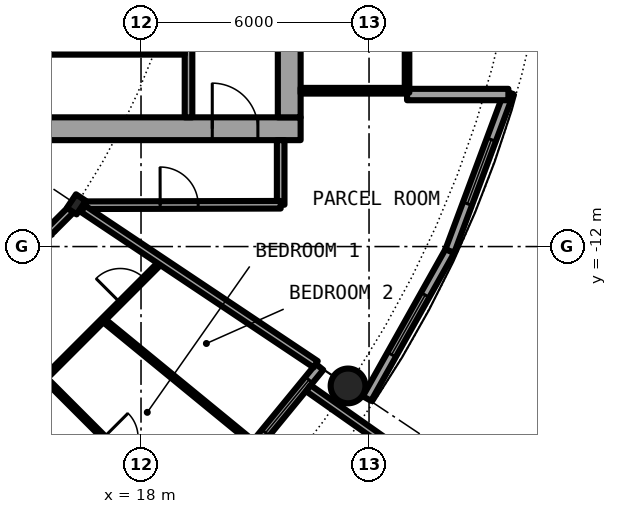
"""IFC4 building model, lengths in metres.
Left out: names, types, materials, properties, quantities, classifications, styles, units other than length and angle.
Written with IfcOpenShell. Run it as: python <this file> out.ifc"""

import sys

from ifc_helpers import new_model, si_unit, direction, frame, frame_2d, origin, origin_2d, place, context, subcontext, project, spatial, rectangle, hollow_circle, i_section, extrude, element, fill, save


model = new_model("IFC4")
c1 = context("Model", 3, precision=1e-05, world=origin(), true_north=direction((0.0, 1.0)))
c2 = subcontext(c1, "Body", "Model", "MODEL_VIEW")
j1 = project(units=[si_unit("LENGTHUNIT", "METRE"), si_unit("PLANEANGLEUNIT", "RADIAN")], contexts=[c1])
p1 = place(None, origin())
s1 = spatial("IfcSite", under=j1, at=p1, CompositionType="ELEMENT")
p2 = place(p1, origin())
s2 = spatial("IfcBuilding", under=s1, at=p2, CompositionType="ELEMENT")
p3 = place(p2, frame((0.0, 0.0, 120.8)))
s3 = spatial("IfcBuildingStorey", under=s2, at=p3, CompositionType="ELEMENT", Elevation=120.8)
p4 = place(p3, frame((23.448, -15.667, 0.0), z_axis=(0.0, 0.0, 1.0), x_axis=(1.0, 0.0, 0.0)))
e1 = element("IfcColumn", 1, at=p4, inside=s3, PredefinedType="COLUMN", context=c2, shape_type="SweptSolid", body=[
    extrude(hollow_circle(Radius=0.457, WallThickness=0.04, at=origin_2d()), origin(), (0.0, 0.0, 1.0), 3.05),
])
p5 = place(p3, frame((16.297, -10.889, 0.0), z_axis=(0.0, 0.0, 1.0), x_axis=(0.831469612303, -0.55557023302, 0.0)))
e2 = element("IfcColumn", 2, at=p5, inside=s3, PredefinedType="COLUMN", context=c2, shape_type="SweptSolid", body=[
    extrude(i_section(OverallWidth=0.307, OverallDepth=0.432, WebThickness=0.021, FlangeThickness=0.04, FilletRadius=0.027, at=origin_2d()), origin(), (0.0, 0.0, 1.0), 3.05),
])
p6 = place(p3, frame((19.304, -19.304, 0.0), z_axis=(0.0, 0.0, 1.0), x_axis=(0.634382322723, 0.773019449054, 0.0)))
e3 = element("IfcWall", 3, at=p6, inside=s3, PredefinedType="SOLIDWALL", context=c2, shape_type="SweptSolid", body=[
    extrude(rectangle(XDim=5.352, YDim=0.25, at=frame_2d((2.676, 0.0))), origin(), (0.0, 0.0, 1.0), 2.7),
])
p7 = place(p6, frame((0.841, 0.0, 0.0)))
e4 = element("IfcOpeningElement", 4, at=p7, cuts=e3, PredefinedType="OPENING", context=c2, shape_type="SweptSolid", body=[
    extrude(rectangle(XDim=1.0, YDim=2.2, at=frame_2d((0.5, 1.1))), frame((0.0, 0.135, 0.0), z_axis=(0.0, -1.0, 0.0), x_axis=(1.0, 0.0, 0.0)), (0.0, 0.0, 1.0), 0.27),
])
p8 = place(p6, frame((3.111, 0.0, 0.3)))
e5 = element("IfcOpeningElement", 5, at=p8, cuts=e3, PredefinedType="OPENING", context=c2, shape_type="SweptSolid", body=[
    extrude(rectangle(XDim=1.8, YDim=2.1, at=frame_2d((0.9, 1.05))), frame((0.0, 0.135, 0.0), z_axis=(0.0, -1.0, 0.0), x_axis=(1.0, 0.0, 0.0)), (0.0, 0.0, 1.0), 0.27),
])
p9 = place(p3, frame((22.402, -15.726, -0.03), z_axis=(0.0, 0.0, 1.0), x_axis=(0.818275399393, -0.574826383135, 0.0)))
e6 = element("IfcWall", 6, at=p9, inside=s3, PredefinedType="SOLIDWALL", context=c2, shape_type="SweptSolid", body=[
    extrude(rectangle(XDim=2.929, YDim=0.2, at=frame_2d((1.465, 0.0))), origin(), (0.0, 0.0, 1.0), 2.73),
])
p10 = place(p3, frame((23.946, -16.0, 0.0), z_axis=(0.0, 0.0, 1.0), x_axis=(0.489696356642, 0.871893042919, 0.0)))
e7 = element("IfcWall", 7, at=p10, inside=s3, PredefinedType="SOLIDWALL", context=c2, shape_type="SweptSolid", body=[
    extrude(rectangle(XDim=4.454, YDim=0.25, at=frame_2d((2.227, 0.0))), origin(), (0.0, 0.0, 1.0), 2.7),
])
p11 = place(p10, frame((1.327, 0.0, 0.3)))
e8 = element("IfcOpeningElement", 8, at=p11, cuts=e7, PredefinedType="OPENING", context=c2, shape_type="SweptSolid", body=[
    extrude(rectangle(XDim=1.8, YDim=2.1, at=frame_2d((0.9, 1.05))), frame((0.0, 0.135, 0.0), z_axis=(0.0, -1.0, 0.0), x_axis=(1.0, 0.0, 0.0)), (0.0, 0.0, 1.0), 0.27),
])
p12 = place(p3, frame((26.127, -12.117, 0.0), z_axis=(0.0, 0.0, 1.0), x_axis=(0.349247811493, 0.937030397675, 0.0)))
e9 = element("IfcWall", 9, at=p12, inside=s3, PredefinedType="SOLIDWALL", context=c2, shape_type="SweptSolid", body=[
    extrude(rectangle(XDim=4.452, YDim=0.25, at=frame_2d((2.226, 0.0))), origin(), (0.0, 0.0, 1.0), 2.7),
])
p13 = place(p12, frame((1.327, 0.0, 0.3)))
e10 = element("IfcOpeningElement", 10, at=p13, cuts=e9, PredefinedType="OPENING", context=c2, shape_type="SweptSolid", body=[
    extrude(rectangle(XDim=1.8, YDim=2.1, at=frame_2d((0.9, 1.05))), frame((0.0, 0.135, 0.0), z_axis=(0.0, -1.0, 0.0), x_axis=(1.0, 0.0, 0.0)), (0.0, 0.0, 1.0), 0.27),
])
p14 = place(p3, frame((25.0, -8.0, 0.0), z_axis=(0.0, 0.0, 1.0), x_axis=(1.0, 0.0, 0.0)))
e11 = element("IfcWall", 11, at=p14, inside=s3, PredefinedType="SOLIDWALL", context=c2, shape_type="SweptSolid", body=[
    extrude(rectangle(XDim=2.667, YDim=0.3, at=frame_2d((1.333, 0.0))), origin(), (0.0, 0.0, 1.0), 2.7),
])
p15 = place(p3, frame((8.4, -8.9, 0.0), z_axis=(0.0, 0.0, 1.0), x_axis=(1.0, 0.0, 0.0)))
e12 = element("IfcWall", 12, at=p15, inside=s3, PredefinedType="SHEAR", context=c2, shape_type="SweptSolid", body=[
    extrude(rectangle(XDim=13.8, YDim=0.6, at=frame_2d((6.9, 0.0))), origin(), (0.0, 0.0, 1.0), 3.05),
])
p16 = place(p15, frame((11.475, 0.0, 0.0)))
e13 = element("IfcOpeningElement", 13, at=p16, cuts=e12, PredefinedType="OPENING", context=c2, shape_type="SweptSolid", body=[
    extrude(rectangle(XDim=1.2, YDim=2.3, at=frame_2d((0.6, 1.15))), frame((0.0, 0.31, 0.0), z_axis=(0.0, -1.0, 0.0), x_axis=(1.0, 0.0, 0.0)), (0.0, 0.0, 1.0), 0.62),
])
p17 = place(p3, frame((21.9, 8.6, 0.0), z_axis=(0.0, 0.0, 1.0), x_axis=(0.0, -1.0, 0.0)))
e14 = element("IfcWall", 14, at=p17, inside=s3, PredefinedType="SHEAR", context=c2, shape_type="SweptSolid", body=[
    extrude(rectangle(XDim=17.2, YDim=0.6, at=frame_2d((8.6, 0.0))), origin(), (0.0, 0.0, 1.0), 3.05),
])
p18 = place(p17, frame((7.7, 0.0, 0.0)))
e15 = element("IfcOpeningElement", 15, at=p18, cuts=e14, PredefinedType="OPENING", context=c2, shape_type="SweptSolid", body=[
    extrude(rectangle(XDim=1.8, YDim=2.3, at=frame_2d((0.9, 1.15))), frame((0.0, 0.31, 0.0), z_axis=(0.0, -1.0, 0.0), x_axis=(1.0, 0.0, 0.0)), (0.0, 0.0, 1.0), 0.62),
])
p19 = place(p3, frame((19.25, -8.6, 0.0), z_axis=(0.0, 0.0, 1.0), x_axis=(0.0, 1.0, 0.0)))
e16 = element("IfcWall", 16, at=p19, inside=s3, PredefinedType="SOLIDWALL", context=c2, shape_type="SweptSolid", body=[
    extrude(rectangle(XDim=7.025, YDim=0.2, at=frame_2d((3.513, 0.0))), origin(), (0.0, 0.0, 1.0), 2.7),
])
p20 = place(p19, frame((2.35, 0.0, 0.0)))
e17 = element("IfcOpeningElement", 17, at=p20, cuts=e16, PredefinedType="OPENING", context=c2, shape_type="SweptSolid", body=[
    extrude(rectangle(XDim=1.1, YDim=2.3, at=frame_2d((0.55, 1.15))), frame((0.0, 0.11, 0.0), z_axis=(0.0, -1.0, 0.0), x_axis=(1.0, 0.0, 0.0)), (0.0, 0.0, 1.0), 0.22),
])
p21 = place(p3, frame((15.45, -6.875, 0.0), z_axis=(0.0, 0.0, 1.0), x_axis=(1.0, 0.0, 0.0)))
e18 = element("IfcWall", 18, at=p21, inside=s3, PredefinedType="PARTITIONING", context=c2, shape_type="SweptSolid", body=[
    extrude(rectangle(XDim=3.7, YDim=0.15, at=frame_2d((1.85, 0.0))), origin(), (0.0, 0.0, 1.0), 2.7),
])
p22 = place(p21, frame((1.4, 0.0, 0.0)))
e19 = element("IfcOpeningElement", 19, at=p22, cuts=e18, PredefinedType="OPENING", context=c2, shape_type="SweptSolid", body=[
    extrude(rectangle(XDim=0.9, YDim=2.3, at=frame_2d((0.45, 1.15))), frame((0.0, 0.085, 0.0), z_axis=(0.0, -1.0, 0.0), x_axis=(1.0, 0.0, 0.0)), (0.0, 0.0, 1.0), 0.17),
])
p23 = place(p3, frame((22.2, -7.9, 0.0), z_axis=(0.0, 0.0, 1.0), x_axis=(1.0, 0.0, 0.0)))
e20 = element("IfcWall", 20, at=p23, inside=s3, PredefinedType="PARTITIONING", context=c2, shape_type="SweptSolid", body=[
    extrude(rectangle(XDim=2.74, YDim=0.15, at=frame_2d((1.37, 0.0))), origin(), (0.0, 0.0, 1.0), 2.7),
])
p24 = place(p3, frame((25.0, -7.95, 0.0), z_axis=(0.0, 0.0, 1.0), x_axis=(0.0, 1.0, 0.0)))
e21 = element("IfcWall", 21, at=p24, inside=s3, PredefinedType="PARTITIONING", context=c2, shape_type="SweptSolid", body=[
    extrude(rectangle(XDim=15.9, YDim=0.12, at=frame_2d((7.95, 0.0))), origin(), (0.0, 0.0, 1.0), 2.7),
])
p25 = place(p24, frame((0.95, 0.0, 0.1)))
e22 = element("IfcOpeningElement", 22, at=p25, cuts=e21, PredefinedType="OPENING", context=c2, shape_type="SweptSolid", body=[
    extrude(rectangle(XDim=14.0, YDim=2.35, at=frame_2d((7.0, 1.175))), frame((0.0, 0.07, 0.0), z_axis=(0.0, -1.0, 0.0), x_axis=(1.0, 0.0, 0.0)), (0.0, 0.0, 1.0), 0.14),
])
p26 = place(p3, frame((15.468, -15.463, 0.0), z_axis=(0.0, 0.0, 1.0), x_axis=(0.707106781187, 0.707106781187, 0.0)))
e23 = element("IfcWall", 23, at=p26, inside=s3, PredefinedType="PARTITIONING", context=c2, shape_type="SweptSolid", body=[
    extrude(rectangle(XDim=4.351, YDim=0.1, at=frame_2d((2.176, 0.0))), origin(), (0.0, 0.0, 1.0), 2.7),
])
p27 = place(p26, frame((2.808, 0.0, 0.0)))
e24 = element("IfcOpeningElement", 24, at=p27, cuts=e23, PredefinedType="OPENING", context=c2, shape_type="SweptSolid", body=[
    extrude(rectangle(XDim=0.9, YDim=2.3, at=frame_2d((0.45, 1.15))), frame((0.0, 0.06, 0.0), z_axis=(0.0, -1.0, 0.0), x_axis=(1.0, 0.0, 0.0)), (0.0, 0.0, 1.0), 0.12),
])
p28 = place(p3, frame((21.675, -10.9, 0.0), z_axis=(0.0, 0.0, 1.0), x_axis=(0.0, 1.0, 0.0)))
e25 = element("IfcWall", 25, at=p28, inside=s3, PredefinedType="PARTITIONING", context=c2, shape_type="SweptSolid", body=[
    extrude(rectangle(XDim=1.7, YDim=0.2, at=frame_2d((0.85, 0.0))), origin(), (0.0, 0.0, 1.0), 2.7),
])
p29 = place(p3, frame((11.0, -16.186, 0.0), z_axis=(0.0, 0.0, 1.0), x_axis=(0.707106781187, 0.707106781187, 0.0)))
e26 = element("IfcWall", 26, at=p29, inside=s3, PredefinedType="PARTITIONING", context=c2, shape_type="SweptSolid", body=[
    extrude(rectangle(XDim=7.334, YDim=0.2, at=frame_2d((3.667, 0.0))), origin(), (0.0, 0.0, 1.0), 2.39),
])
p30 = place(p29, frame((4.123, 0.0, 0.0)))
e27 = element("IfcOpeningElement", 27, at=p30, cuts=e26, PredefinedType="OPENING", context=c2, shape_type="SweptSolid", body=[
    extrude(rectangle(XDim=1.0, YDim=2.3, at=frame_2d((0.5, 1.15))), frame((0.0, 0.11, 0.0), z_axis=(0.0, -1.0, 0.0), x_axis=(1.0, 0.0, 0.0)), (0.0, 0.0, 1.0), 0.22),
])
p31 = place(p3, frame((16.541, -10.912, 0.0), z_axis=(0.0, 0.0, 1.0), x_axis=(0.999997173357, 0.002377662213, 0.0)))
e28 = element("IfcWall", 28, at=p31, inside=s3, PredefinedType="PARTITIONING", context=c2, shape_type="SweptSolid", body=[
    extrude(rectangle(XDim=5.134, YDim=0.2, at=frame_2d((2.567, 0.0))), origin(), (0.0, 0.0, 1.0), 2.7),
])
p32 = place(p31, frame((1.963, 0.0, 0.0)))
e29 = element("IfcOpeningElement", 29, at=p32, cuts=e28, PredefinedType="OPENING", context=c2, shape_type="SweptSolid", body=[
    extrude(rectangle(XDim=1.0, YDim=2.3, at=frame_2d((0.5, 1.15))), frame((0.0, 0.11, 0.0), z_axis=(0.0, -1.0, 0.0), x_axis=(1.0, 0.0, 0.0)), (0.0, 0.0, 1.0), 0.22),
])
p33 = place(p3, frame((15.465, -15.465, 0.0), z_axis=(0.0, 0.0, 1.0), x_axis=(0.707106781187, -0.707106781187, 0.0)))
e30 = element("IfcWall", 30, at=p33, inside=s3, PredefinedType="PARTITIONING", context=c2, shape_type="SweptSolid", body=[
    extrude(rectangle(XDim=5.305, YDim=0.1, at=frame_2d((2.652, 0.0))), origin(), (0.0, 0.0, 1.0), 2.7),
])
p34 = place(p33, frame((2.202, 0.0, 0.0)))
e31 = element("IfcOpeningElement", 31, at=p34, cuts=e30, PredefinedType="OPENING", context=c2, shape_type="SweptSolid", body=[
    extrude(rectangle(XDim=0.9, YDim=2.3, at=frame_2d((0.45, 1.15))), frame((0.0, 0.06, 0.0), z_axis=(0.0, -1.0, 0.0), x_axis=(1.0, 0.0, 0.0)), (0.0, 0.0, 1.0), 0.12),
])
p35 = place(p3, frame((16.477, -11.009, 0.0), z_axis=(0.0, 0.0, 1.0), x_axis=(0.831467903109, -0.555572791, 0.0)))
e32 = element("IfcWall", 32, at=p35, inside=s3, PredefinedType="PARTITIONING", context=c2, shape_type="SweptSolid", body=[
    extrude(rectangle(XDim=7.358, YDim=0.2, at=frame_2d((3.679, 0.0))), origin(), (0.0, 0.0, 1.0), 2.7),
])
p36 = place(p3, frame((17.004, -13.927, 0.0), z_axis=(0.0, 0.0, 1.0), x_axis=(0.773517471898, -0.633774976367, 0.0)))
e33 = element("IfcWall", 33, at=p36, inside=s3, PredefinedType="PARTITIONING", context=c2, shape_type="SweptSolid", body=[
    extrude(rectangle(XDim=5.196, YDim=0.1, at=frame_2d((2.598, 0.0))), origin(), (0.0, 0.0, 1.0), 2.7),
])
p37 = place(p8, origin())
e34 = element("IfcWindow", 34, at=p37, inside=s3, PartitioningType="SINGLE_PANEL", PredefinedType="WINDOW", context=c2, shape_type="SweptSolid", body=[
    extrude(rectangle(XDim=1.8, YDim=2.1, at=frame_2d((0.9, 1.05))), frame((0.0, 0.03, 0.0), z_axis=(0.0, -1.0, 0.0), x_axis=(1.0, 0.0, 0.0)), (0.0, 0.0, 1.0), 0.06),
])
fill(e5, e34)
p38 = place(p11, origin())
e35 = element("IfcWindow", 35, at=p38, inside=s3, PartitioningType="SINGLE_PANEL", PredefinedType="WINDOW", context=c2, shape_type="SweptSolid", body=[
    extrude(rectangle(XDim=1.8, YDim=2.1, at=frame_2d((0.9, 1.05))), frame((0.0, 0.03, 0.0), z_axis=(0.0, -1.0, 0.0), x_axis=(1.0, 0.0, 0.0)), (0.0, 0.0, 1.0), 0.06),
])
fill(e8, e35)
p39 = place(p13, origin())
e36 = element("IfcWindow", 36, at=p39, inside=s3, PartitioningType="SINGLE_PANEL", PredefinedType="WINDOW", context=c2, shape_type="SweptSolid", body=[
    extrude(rectangle(XDim=1.8, YDim=2.1, at=frame_2d((0.9, 1.05))), frame((0.0, 0.03, 0.0), z_axis=(0.0, -1.0, 0.0), x_axis=(1.0, 0.0, 0.0)), (0.0, 0.0, 1.0), 0.06),
])
fill(e10, e36)
p40 = place(p22, origin())
e37 = element("IfcDoor", 37, at=p40, inside=s3, OperationType="SINGLE_SWING_LEFT", PredefinedType="DOOR", context=c2, shape_type="SweptSolid", body=[
    extrude(rectangle(XDim=0.9, YDim=2.3, at=frame_2d((0.45, 1.15))), frame((0.0, 0.025, 0.0), z_axis=(0.0, -1.0, 0.0), x_axis=(1.0, 0.0, 0.0)), (0.0, 0.0, 1.0), 0.05),
])
fill(e19, e37)
p41 = place(p16, origin())
e38 = element("IfcDoor", 38, at=p41, inside=s3, OperationType="SINGLE_SWING_LEFT", PredefinedType="DOOR", context=c2, shape_type="SweptSolid", body=[
    extrude(rectangle(XDim=1.2, YDim=2.3, at=frame_2d((0.6, 1.15))), frame((0.0, 0.025, 0.0), z_axis=(0.0, -1.0, 0.0), x_axis=(1.0, 0.0, 0.0)), (0.0, 0.0, 1.0), 0.05),
])
fill(e13, e38)
p42 = place(p25, origin())
e39 = element("IfcWindow", 39, at=p42, inside=s3, PartitioningType="SINGLE_PANEL", PredefinedType="WINDOW", context=c2, shape_type="SweptSolid", body=[
    extrude(rectangle(XDim=14.0, YDim=2.35, at=frame_2d((7.0, 1.175))), frame((0.0, 0.03, 0.0), z_axis=(0.0, -1.0, 0.0), x_axis=(1.0, 0.0, 0.0)), (0.0, 0.0, 1.0), 0.06),
])
fill(e22, e39)
p43 = place(p27, origin())
e40 = element("IfcDoor", 40, at=p43, inside=s3, OperationType="SINGLE_SWING_RIGHT", PredefinedType="DOOR", context=c2, shape_type="SweptSolid", body=[
    extrude(rectangle(XDim=0.9, YDim=2.3, at=frame_2d((0.45, 1.15))), frame((0.0, 0.025, 0.0), z_axis=(0.0, -1.0, 0.0), x_axis=(1.0, 0.0, 0.0)), (0.0, 0.0, 1.0), 0.05),
])
fill(e24, e40)
p44 = place(p32, origin())
e41 = element("IfcDoor", 41, at=p44, inside=s3, OperationType="SINGLE_SWING_LEFT", PredefinedType="DOOR", context=c2, shape_type="SweptSolid", body=[
    extrude(rectangle(XDim=1.0, YDim=2.3, at=frame_2d((0.5, 1.15))), frame((0.0, 0.025, 0.0), z_axis=(0.0, -1.0, 0.0), x_axis=(1.0, 0.0, 0.0)), (0.0, 0.0, 1.0), 0.05),
])
fill(e29, e41)
save(model, sys.argv[1])
